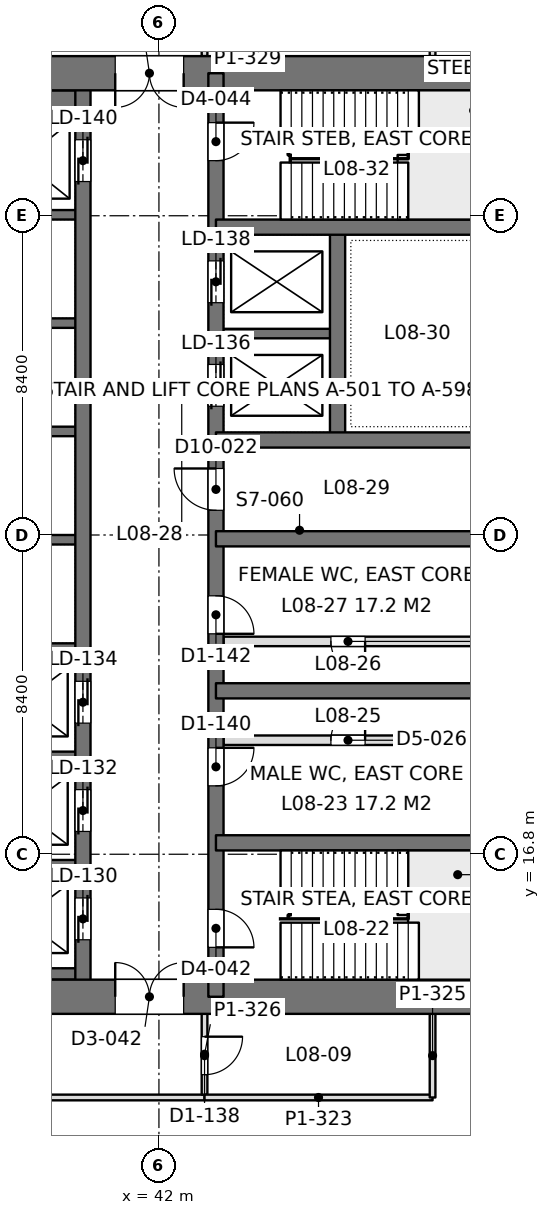
"""IFC4 building model, lengths in metres.
Left out: names, types, materials, properties, quantities, classifications, styles, units other than length and angle.
Written with IfcOpenShell. Run it as: python <this file> out.ifc"""

import sys

from ifc_helpers import new_model, si_unit, direction, frame, frame_2d, origin, place, context, subcontext, project, spatial, rectangle, extrude, element, fill, save


model = new_model("IFC4")
c1 = context("Model", 3, precision=1e-05, world=origin(), true_north=direction((0.0, 1.0)))
c2 = subcontext(c1, "Body", "Model", "MODEL_VIEW")
j1 = project(units=[si_unit("LENGTHUNIT", "METRE"), si_unit("PLANEANGLEUNIT", "RADIAN")], contexts=[c1])
p1 = place(None, origin())
s1 = spatial("IfcSite", under=j1, at=p1, CompositionType="ELEMENT")
p2 = place(p1, origin())
s2 = spatial("IfcBuilding", under=s1, at=p2, CompositionType="ELEMENT")
p3 = place(p2, frame((0.0, 0.0, 36.9)))
s3 = spatial("IfcBuildingStorey", under=s2, at=p3, CompositionType="ELEMENT", Elevation=36.9)
p4 = place(p3, frame((33.6, 13.05, 0.0), z_axis=(0.0, 0.0, 1.0), x_axis=(1.0, 0.0, 0.0)))
e1 = element("IfcWall", 1, at=p4, inside=s3, PredefinedType="SHEAR", context=c2, shape_type="SweptSolid", body=[
    extrude(rectangle(XDim=18.0, YDim=0.9, at=frame_2d((9.0, 0.0))), origin(), (0.0, 0.0, 1.0), 4.5),
])
p5 = place(p4, frame((7.25, 0.0, 0.0)))
e2 = element("IfcOpeningElement", 2, at=p5, cuts=e1, PredefinedType="OPENING", context=c2, shape_type="SweptSolid", body=[
    extrude(rectangle(XDim=1.8, YDim=2.4, at=frame_2d((0.9, 1.2))), frame((0.0, 0.46, 0.0), z_axis=(0.0, -1.0, 0.0), x_axis=(1.0, 0.0, 0.0)), (0.0, 0.0, 1.0), 0.92),
])
p6 = place(p3, frame((33.6, 37.35, 0.0), z_axis=(0.0, 0.0, 1.0), x_axis=(1.0, 0.0, 0.0)))
e3 = element("IfcWall", 3, at=p6, inside=s3, PredefinedType="SHEAR", context=c2, shape_type="SweptSolid", body=[
    extrude(rectangle(XDim=18.0, YDim=0.9, at=frame_2d((9.0, 0.0))), origin(), (0.0, 0.0, 1.0), 4.5),
])
p7 = place(p6, frame((7.25, 0.0, 0.0)))
e4 = element("IfcOpeningElement", 4, at=p7, cuts=e3, PredefinedType="OPENING", context=c2, shape_type="SweptSolid", body=[
    extrude(rectangle(XDim=1.8, YDim=2.4, at=frame_2d((0.9, 1.2))), frame((0.0, 0.46, 0.0), z_axis=(0.0, -1.0, 0.0), x_axis=(1.0, 0.0, 0.0)), (0.0, 0.0, 1.0), 0.92),
])
p8 = place(p3, frame((43.5, 13.05, 0.0), z_axis=(0.0, 0.0, 1.0), x_axis=(0.0, 1.0, 0.0)))
e5 = element("IfcWall", 5, at=p8, inside=s3, PredefinedType="SHEAR", context=c2, shape_type="SweptSolid", body=[
    extrude(rectangle(XDim=24.3, YDim=0.4, at=frame_2d((12.15, 0.0))), origin(), (0.0, 0.0, 1.0), 4.5),
])
p9 = place(p8, frame((1.3, 0.0, 0.0)))
e6 = element("IfcOpeningElement", 6, at=p9, cuts=e5, PredefinedType="OPENING", context=c2, shape_type="SweptSolid", body=[
    extrude(rectangle(XDim=1.0, YDim=2.2, at=frame_2d((0.5, 1.1))), frame((0.0, 0.21, 0.0), z_axis=(0.0, -1.0, 0.0), x_axis=(1.0, 0.0, 0.0)), (0.0, 0.0, 1.0), 0.42),
])
p10 = place(p8, frame((22.0, 0.0, 0.0)))
e7 = element("IfcOpeningElement", 7, at=p10, cuts=e5, PredefinedType="OPENING", context=c2, shape_type="SweptSolid", body=[
    extrude(rectangle(XDim=1.0, YDim=2.2, at=frame_2d((0.5, 1.1))), frame((0.0, 0.21, 0.0), z_axis=(0.0, -1.0, 0.0), x_axis=(1.0, 0.0, 0.0)), (0.0, 0.0, 1.0), 0.42),
])
p11 = place(p8, frame((5.55, 0.0, 0.0)))
e8 = element("IfcOpeningElement", 8, at=p11, cuts=e5, PredefinedType="OPENING", context=c2, shape_type="SweptSolid", body=[
    extrude(rectangle(XDim=1.0, YDim=2.2, at=frame_2d((0.5, 1.1))), frame((0.0, 0.21, 0.0), z_axis=(0.0, -1.0, 0.0), x_axis=(1.0, 0.0, 0.0)), (0.0, 0.0, 1.0), 0.42),
])
p12 = place(p8, frame((9.55, 0.0, 0.0)))
e9 = element("IfcOpeningElement", 9, at=p12, cuts=e5, PredefinedType="OPENING", context=c2, shape_type="SweptSolid", body=[
    extrude(rectangle(XDim=1.0, YDim=2.2, at=frame_2d((0.5, 1.1))), frame((0.0, 0.21, 0.0), z_axis=(0.0, -1.0, 0.0), x_axis=(1.0, 0.0, 0.0)), (0.0, 0.0, 1.0), 0.42),
])
p13 = place(p8, frame((12.8, 0.0, 0.0)))
e10 = element("IfcOpeningElement", 10, at=p13, cuts=e5, PredefinedType="OPENING", context=c2, shape_type="SweptSolid", body=[
    extrude(rectangle(XDim=1.1, YDim=2.2, at=frame_2d((0.55, 1.1))), frame((0.0, 0.21, 0.0), z_axis=(0.0, -1.0, 0.0), x_axis=(1.0, 0.0, 0.0)), (0.0, 0.0, 1.0), 0.42),
])
p14 = place(p8, frame((15.538, 0.0, 0.0)))
e11 = element("IfcOpeningElement", 11, at=p14, cuts=e5, PredefinedType="OPENING", context=c2, shape_type="SweptSolid", body=[
    extrude(rectangle(XDim=1.1, YDim=2.2, at=frame_2d((0.55, 1.1))), frame((0.0, 0.21, 0.0), z_axis=(0.0, -1.0, 0.0), x_axis=(1.0, 0.0, 0.0)), (0.0, 0.0, 1.0), 0.42),
])
p15 = place(p8, frame((18.262, 0.0, 0.0)))
e12 = element("IfcOpeningElement", 12, at=p15, cuts=e5, PredefinedType="OPENING", context=c2, shape_type="SweptSolid", body=[
    extrude(rectangle(XDim=1.1, YDim=2.2, at=frame_2d((0.55, 1.1))), frame((0.0, 0.21, 0.0), z_axis=(0.0, -1.0, 0.0), x_axis=(1.0, 0.0, 0.0)), (0.0, 0.0, 1.0), 0.42),
])
p16 = place(p3, frame((40.0, 13.05, 0.0), z_axis=(0.0, 0.0, 1.0), x_axis=(0.0, 1.0, 0.0)))
e13 = element("IfcWall", 13, at=p16, inside=s3, PredefinedType="SHEAR", context=c2, shape_type="SweptSolid", body=[
    extrude(rectangle(XDim=24.3, YDim=0.4, at=frame_2d((12.15, 0.0))), origin(), (0.0, 0.0, 1.0), 4.5),
])
p17 = place(p16, frame((1.5, 0.0, 0.0)))
e14 = element("IfcOpeningElement", 14, at=p17, cuts=e13, PredefinedType="OPENING", context=c2, shape_type="SweptSolid", body=[
    extrude(rectangle(XDim=1.1, YDim=2.2, at=frame_2d((0.55, 1.1))), frame((0.0, 0.21, 0.0), z_axis=(0.0, -1.0, 0.0), x_axis=(1.0, 0.0, 0.0)), (0.0, 0.0, 1.0), 0.42),
])
p18 = place(p16, frame((4.35, 0.0, 0.0)))
e15 = element("IfcOpeningElement", 15, at=p18, cuts=e13, PredefinedType="OPENING", context=c2, shape_type="SweptSolid", body=[
    extrude(rectangle(XDim=1.1, YDim=2.2, at=frame_2d((0.55, 1.1))), frame((0.0, 0.21, 0.0), z_axis=(0.0, -1.0, 0.0), x_axis=(1.0, 0.0, 0.0)), (0.0, 0.0, 1.0), 0.42),
])
p19 = place(p16, frame((7.2, 0.0, 0.0)))
e16 = element("IfcOpeningElement", 16, at=p19, cuts=e13, PredefinedType="OPENING", context=c2, shape_type="SweptSolid", body=[
    extrude(rectangle(XDim=1.1, YDim=2.2, at=frame_2d((0.55, 1.1))), frame((0.0, 0.21, 0.0), z_axis=(0.0, -1.0, 0.0), x_axis=(1.0, 0.0, 0.0)), (0.0, 0.0, 1.0), 0.42),
])
p20 = place(p16, frame((21.45, 0.0, 0.0)))
e17 = element("IfcOpeningElement", 17, at=p20, cuts=e13, PredefinedType="OPENING", context=c2, shape_type="SweptSolid", body=[
    extrude(rectangle(XDim=1.1, YDim=2.2, at=frame_2d((0.55, 1.1))), frame((0.0, 0.21, 0.0), z_axis=(0.0, -1.0, 0.0), x_axis=(1.0, 0.0, 0.0)), (0.0, 0.0, 1.0), 0.42),
])
for number, where, z_axis, x_axis in (
    (18, (51.15, 17.1, 0.0), (0.0, 0.0, 1.0), (-1.0, 0.0, 0.0)),
    (19, (51.15, 21.1, 0.0), (0.0, 0.0, 1.0), (-1.0, 0.0, 0.0)),
    (20, (51.15, 25.1, 0.0), (0.0, 0.0, 1.0), (-1.0, 0.0, 0.0)),
    (21, (51.15, 27.7, 0.0), (0.0, 0.0, 1.0), (-1.0, 0.0, 0.0)),
    (22, (51.15, 33.3, 0.0), (0.0, 0.0, 1.0), (-1.0, 0.0, 0.0)),
):
    element("IfcWall", number, at=place(p3, frame(where, z_axis=z_axis, x_axis=x_axis)), inside=s3, PredefinedType="SHEAR", context=c2, shape_type="SweptSolid", body=[
        extrude(rectangle(XDim=7.65, YDim=0.4, at=frame_2d((3.825, 0.0))), origin(), (0.0, 0.0, 1.0), 4.5),
    ])
p21 = place(p3, frame((46.7, 27.7, 0.0), z_axis=(0.0, 0.0, 1.0), x_axis=(0.0, 1.0, 0.0)))
e23 = element("IfcWall", 23, at=p21, inside=s3, PredefinedType="SHEAR", context=c2, shape_type="SweptSolid", body=[
    extrude(rectangle(XDim=5.6, YDim=0.4, at=frame_2d((2.8, 0.0))), origin(), (0.0, 0.0, 1.0), 4.5),
])
p22 = place(p3, frame((46.7, 30.5, 0.0), z_axis=(0.0, 0.0, 1.0), x_axis=(-1.0, 0.0, 0.0)))
e24 = element("IfcWall", 24, at=p22, inside=s3, PredefinedType="SHEAR", context=c2, shape_type="SweptSolid", body=[
    extrude(rectangle(XDim=3.2, YDim=0.25, at=frame_2d((1.6, 0.0))), origin(), (0.0, 0.0, 1.0), 4.5),
])
p23 = place(p3, frame((40.0, 13.65, 0.0), z_axis=(0.0, 0.0, 1.0), x_axis=(-1.0, 0.0, 0.0)))
e25 = element("IfcWall", 25, at=p23, inside=s3, PredefinedType="SHEAR", context=c2, shape_type="SweptSolid", body=[
    extrude(rectangle(XDim=3.2, YDim=0.3, at=frame_2d((1.6, 0.0))), origin(), (0.0, 0.0, 1.0), 4.5),
])
for number, where, z_axis, x_axis in (
    (26, (40.0, 16.525, 0.0), (0.0, 0.0, 1.0), (-1.0, 0.0, 0.0)),
    (27, (40.0, 19.375, 0.0), (0.0, 0.0, 1.0), (-1.0, 0.0, 0.0)),
    (28, (40.0, 22.225, 0.0), (0.0, 0.0, 1.0), (-1.0, 0.0, 0.0)),
    (29, (40.0, 25.075, 0.0), (0.0, 0.0, 1.0), (-1.0, 0.0, 0.0)),
    (30, (40.0, 27.925, 0.0), (0.0, 0.0, 1.0), (-1.0, 0.0, 0.0)),
    (31, (40.0, 30.775, 0.0), (0.0, 0.0, 1.0), (-1.0, 0.0, 0.0)),
    (32, (40.0, 33.625, 0.0), (0.0, 0.0, 1.0), (-1.0, 0.0, 0.0)),
):
    element("IfcWall", number, at=place(p3, frame(where, z_axis=z_axis, x_axis=x_axis)), inside=s3, PredefinedType="SHEAR", context=c2, shape_type="SweptSolid", body=[
        extrude(rectangle(XDim=3.2, YDim=0.25, at=frame_2d((1.6, 0.0))), origin(), (0.0, 0.0, 1.0), 4.5),
    ])
p24 = place(p3, frame((40.0, 36.625, 0.0), z_axis=(0.0, 0.0, 1.0), x_axis=(-1.0, 0.0, 0.0)))
e33 = element("IfcWall", 33, at=p24, inside=s3, PredefinedType="SHEAR", context=c2, shape_type="SweptSolid", body=[
    extrude(rectangle(XDim=3.2, YDim=0.55, at=frame_2d((1.6, 0.0))), origin(), (0.0, 0.0, 1.0), 4.5),
])
p25 = place(p3, frame((1.2, 10.4, 0.0), z_axis=(0.0, 0.0, 1.0), x_axis=(1.0, 0.0, 0.0)))
e34 = element("IfcWall", 34, at=p25, inside=s3, PredefinedType="PARTITIONING", context=c2, shape_type="SweptSolid", body=[
    extrude(rectangle(XDim=42.002, YDim=0.15, at=frame_2d((21.001, 0.0))), origin(), (0.0, 0.0, 1.0), 3.74),
])
p26 = place(p25, frame((2.1, 0.0, 0.0)))
e35 = element("IfcOpeningElement", 35, at=p26, cuts=e34, PredefinedType="OPENING", context=c2, shape_type="SweptSolid", body=[
    extrude(rectangle(XDim=1.8, YDim=2.2, at=frame_2d((0.9, 1.1))), frame((0.0, 0.085, 0.0), z_axis=(0.0, -1.0, 0.0), x_axis=(1.0, 0.0, 0.0)), (0.0, 0.0, 1.0), 0.17),
])
p27 = place(p25, frame((10.5, 0.0, 0.0)))
e36 = element("IfcOpeningElement", 36, at=p27, cuts=e34, PredefinedType="OPENING", context=c2, shape_type="SweptSolid", body=[
    extrude(rectangle(XDim=1.8, YDim=2.2, at=frame_2d((0.9, 1.1))), frame((0.0, 0.085, 0.0), z_axis=(0.0, -1.0, 0.0), x_axis=(1.0, 0.0, 0.0)), (0.0, 0.0, 1.0), 0.17),
])
p28 = place(p25, frame((18.9, 0.0, 0.0)))
e37 = element("IfcOpeningElement", 37, at=p28, cuts=e34, PredefinedType="OPENING", context=c2, shape_type="SweptSolid", body=[
    extrude(rectangle(XDim=1.8, YDim=2.2, at=frame_2d((0.9, 1.1))), frame((0.0, 0.085, 0.0), z_axis=(0.0, -1.0, 0.0), x_axis=(1.0, 0.0, 0.0)), (0.0, 0.0, 1.0), 0.17),
])
p29 = place(p25, frame((27.3, 0.0, 0.0)))
e38 = element("IfcOpeningElement", 38, at=p29, cuts=e34, PredefinedType="OPENING", context=c2, shape_type="SweptSolid", body=[
    extrude(rectangle(XDim=1.8, YDim=2.2, at=frame_2d((0.9, 1.1))), frame((0.0, 0.085, 0.0), z_axis=(0.0, -1.0, 0.0), x_axis=(1.0, 0.0, 0.0)), (0.0, 0.0, 1.0), 0.17),
])
p30 = place(p25, frame((35.7, 0.0, 0.0)))
e39 = element("IfcOpeningElement", 39, at=p30, cuts=e34, PredefinedType="OPENING", context=c2, shape_type="SweptSolid", body=[
    extrude(rectangle(XDim=1.8, YDim=2.2, at=frame_2d((0.9, 1.1))), frame((0.0, 0.085, 0.0), z_axis=(0.0, -1.0, 0.0), x_axis=(1.0, 0.0, 0.0)), (0.0, 0.0, 1.0), 0.17),
])
p31 = place(p3, frame((43.2, 10.474, 0.0), z_axis=(0.0, 0.0, 1.0), x_axis=(0.0, 1.0, 0.0)))
e40 = element("IfcWall", 40, at=p31, inside=s3, PredefinedType="PARTITIONING", context=c2, shape_type="SweptSolid", body=[
    extrude(rectangle(XDim=2.128, YDim=0.15, at=frame_2d((1.064, 0.0))), origin(), (0.0, 0.0, 1.0), 4.34),
])
p32 = place(p31, frame((0.526, 0.0, 0.0)))
e41 = element("IfcOpeningElement", 41, at=p32, cuts=e40, PredefinedType="OPENING", context=c2, shape_type="SweptSolid", body=[
    extrude(rectangle(XDim=1.0, YDim=2.2, at=frame_2d((0.5, 1.1))), frame((0.0, 0.085, 0.0), z_axis=(0.0, -1.0, 0.0), x_axis=(1.0, 0.0, 0.0)), (0.0, 0.0, 1.0), 0.17),
])
p33 = place(p3, frame((43.198, 10.4, 0.0), z_axis=(0.0, 0.0, 1.0), x_axis=(1.0, 0.0, 0.0)))
e42 = element("IfcWall", 42, at=p33, inside=s3, PredefinedType="PARTITIONING", context=c2, shape_type="SweptSolid", body=[
    extrude(rectangle(XDim=6.002, YDim=0.15, at=frame_2d((3.001, 0.0))), origin(), (0.0, 0.0, 1.0), 4.34),
])
p34 = place(p3, frame((49.2, 10.4, 0.0), z_axis=(0.0, 0.0, 1.0), x_axis=(0.0, 1.0, 0.0)))
e43 = element("IfcWall", 43, at=p34, inside=s3, PredefinedType="PARTITIONING", context=c2, shape_type="SweptSolid", body=[
    extrude(rectangle(XDim=2.202, YDim=0.15, at=frame_2d((1.101, 0.0))), origin(), (0.0, 0.0, 1.0), 4.34),
])
p35 = place(p3, frame((43.2, 37.8, 0.0), z_axis=(0.0, 0.0, 1.0), x_axis=(0.0, 1.0, 0.0)))
e44 = element("IfcWall", 44, at=p35, inside=s3, PredefinedType="PARTITIONING", context=c2, shape_type="SweptSolid", body=[
    extrude(rectangle(XDim=2.126, YDim=0.15, at=frame_2d((1.063, 0.0))), origin(), (0.0, 0.0, 1.0), 4.34),
])
p36 = place(p35, frame((0.6, 0.0, 0.0)))
e45 = element("IfcOpeningElement", 45, at=p36, cuts=e44, PredefinedType="OPENING", context=c2, shape_type="SweptSolid", body=[
    extrude(rectangle(XDim=1.0, YDim=2.2, at=frame_2d((0.5, 1.1))), frame((0.0, 0.085, 0.0), z_axis=(0.0, -1.0, 0.0), x_axis=(1.0, 0.0, 0.0)), (0.0, 0.0, 1.0), 0.17),
])
p37 = place(p3, frame((49.2, 37.8, 0.0), z_axis=(0.0, 0.0, 1.0), x_axis=(0.0, 1.0, 0.0)))
e46 = element("IfcWall", 46, at=p37, inside=s3, PredefinedType="PARTITIONING", context=c2, shape_type="SweptSolid", body=[
    extrude(rectangle(XDim=2.2, YDim=0.15, at=frame_2d((1.1, 0.0))), origin(), (0.0, 0.0, 1.0), 4.34),
])
p38 = place(p3, frame((43.7, 22.4, 0.0), z_axis=(0.0, 0.0, 1.0), x_axis=(1.0, 0.0, 0.0)))
e47 = element("IfcWall", 47, at=p38, inside=s3, PredefinedType="PARTITIONING", context=c2, shape_type="SweptSolid", body=[
    extrude(rectangle(XDim=6.6, YDim=0.25, at=frame_2d((3.3, 0.0))), origin(), (0.0, 0.0, 1.0), 4.3),
])
p39 = place(p38, frame((2.825, 0.0, 0.0)))
e48 = element("IfcOpeningElement", 48, at=p39, cuts=e47, PredefinedType="OPENING", context=c2, shape_type="SweptSolid", body=[
    extrude(rectangle(XDim=0.9, YDim=2.2, at=frame_2d((0.45, 1.1))), frame((0.0, 0.135, 0.0), z_axis=(0.0, -1.0, 0.0), x_axis=(1.0, 0.0, 0.0)), (0.0, 0.0, 1.0), 0.27),
])
p40 = place(p3, frame((43.7, 19.8, 0.0), z_axis=(0.0, 0.0, 1.0), x_axis=(1.0, 0.0, 0.0)))
e49 = element("IfcWall", 49, at=p40, inside=s3, PredefinedType="PARTITIONING", context=c2, shape_type="SweptSolid", body=[
    extrude(rectangle(XDim=6.6, YDim=0.25, at=frame_2d((3.3, 0.0))), origin(), (0.0, 0.0, 1.0), 4.3),
])
p41 = place(p40, frame((2.825, 0.0, 0.0)))
e50 = element("IfcOpeningElement", 50, at=p41, cuts=e49, PredefinedType="OPENING", context=c2, shape_type="SweptSolid", body=[
    extrude(rectangle(XDim=0.9, YDim=2.2, at=frame_2d((0.45, 1.1))), frame((0.0, 0.135, 0.0), z_axis=(0.0, -1.0, 0.0), x_axis=(1.0, 0.0, 0.0)), (0.0, 0.0, 1.0), 0.27),
])
p42 = place(p5, origin())
e51 = element("IfcDoor", 51, at=p42, inside=s3, OperationType="DOUBLE_DOOR_SINGLE_SWING", PredefinedType="DOOR", context=c2, shape_type="SweptSolid", body=[
    extrude(rectangle(XDim=1.8, YDim=2.4, at=frame_2d((0.9, 1.2))), frame((0.0, 0.025, 0.0), z_axis=(0.0, -1.0, 0.0), x_axis=(1.0, 0.0, 0.0)), (0.0, 0.0, 1.0), 0.05),
])
fill(e2, e51)
p43 = place(p7, frame((1.8, 0.0, 0.0), z_axis=(0.0, 0.0, 1.0), x_axis=(-1.0, 0.0, 0.0)))
e52 = element("IfcDoor", 52, at=p43, inside=s3, OperationType="DOUBLE_DOOR_SINGLE_SWING", PredefinedType="DOOR", context=c2, shape_type="SweptSolid", body=[
    extrude(rectangle(XDim=1.8, YDim=2.4, at=frame_2d((0.9, 1.2))), frame((0.0, 0.025, 0.0), z_axis=(0.0, -1.0, 0.0), x_axis=(1.0, 0.0, 0.0)), (0.0, 0.0, 1.0), 0.05),
])
fill(e4, e52)
p44 = place(p9, frame((1.0, 0.0, 0.0), z_axis=(0.0, 0.0, 1.0), x_axis=(-1.0, 0.0, 0.0)))
e53 = element("IfcDoor", 53, at=p44, inside=s3, OperationType="SINGLE_SWING_RIGHT", PredefinedType="DOOR", context=c2, shape_type="SweptSolid", body=[
    extrude(rectangle(XDim=1.0, YDim=2.2, at=frame_2d((0.5, 1.1))), frame((0.0, 0.025, 0.0), z_axis=(0.0, -1.0, 0.0), x_axis=(1.0, 0.0, 0.0)), (0.0, 0.0, 1.0), 0.05),
])
fill(e6, e53)
p45 = place(p10, frame((1.0, 0.0, 0.0), z_axis=(0.0, 0.0, 1.0), x_axis=(-1.0, 0.0, 0.0)))
e54 = element("IfcDoor", 54, at=p45, inside=s3, OperationType="SINGLE_SWING_LEFT", PredefinedType="DOOR", context=c2, shape_type="SweptSolid", body=[
    extrude(rectangle(XDim=1.0, YDim=2.2, at=frame_2d((0.5, 1.1))), frame((0.0, 0.025, 0.0), z_axis=(0.0, -1.0, 0.0), x_axis=(1.0, 0.0, 0.0)), (0.0, 0.0, 1.0), 0.05),
])
fill(e7, e54)
p46 = place(p11, frame((1.0, 0.0, 0.0), z_axis=(0.0, 0.0, 1.0), x_axis=(-1.0, 0.0, 0.0)))
e55 = element("IfcDoor", 55, at=p46, inside=s3, OperationType="SINGLE_SWING_LEFT", PredefinedType="DOOR", context=c2, shape_type="SweptSolid", body=[
    extrude(rectangle(XDim=1.0, YDim=2.2, at=frame_2d((0.5, 1.1))), frame((0.0, 0.025, 0.0), z_axis=(0.0, -1.0, 0.0), x_axis=(1.0, 0.0, 0.0)), (0.0, 0.0, 1.0), 0.05),
])
fill(e8, e55)
p47 = place(p12, frame((1.0, 0.0, 0.0), z_axis=(0.0, 0.0, 1.0), x_axis=(-1.0, 0.0, 0.0)))
e56 = element("IfcDoor", 56, at=p47, inside=s3, OperationType="SINGLE_SWING_RIGHT", PredefinedType="DOOR", context=c2, shape_type="SweptSolid", body=[
    extrude(rectangle(XDim=1.0, YDim=2.2, at=frame_2d((0.5, 1.1))), frame((0.0, 0.025, 0.0), z_axis=(0.0, -1.0, 0.0), x_axis=(1.0, 0.0, 0.0)), (0.0, 0.0, 1.0), 0.05),
])
fill(e9, e56)
p48 = place(p13, origin())
e57 = element("IfcDoor", 57, at=p48, inside=s3, OperationType="SINGLE_SWING_RIGHT", PredefinedType="DOOR", context=c2, shape_type="SweptSolid", body=[
    extrude(rectangle(XDim=1.1, YDim=2.2, at=frame_2d((0.55, 1.1))), frame((0.0, 0.025, 0.0), z_axis=(0.0, -1.0, 0.0), x_axis=(1.0, 0.0, 0.0)), (0.0, 0.0, 1.0), 0.05),
])
fill(e10, e57)
p49 = place(p17, origin())
e58 = element("IfcDoor", 58, at=p49, inside=s3, OperationType="DOUBLE_DOOR_SLIDING", PredefinedType="DOOR", context=c2, shape_type="SweptSolid", body=[
    extrude(rectangle(XDim=1.1, YDim=2.2, at=frame_2d((0.55, 1.1))), frame((0.0, 0.025, 0.0), z_axis=(0.0, -1.0, 0.0), x_axis=(1.0, 0.0, 0.0)), (0.0, 0.0, 1.0), 0.05),
])
fill(e14, e58)
p50 = place(p18, origin())
e59 = element("IfcDoor", 59, at=p50, inside=s3, OperationType="DOUBLE_DOOR_SLIDING", PredefinedType="DOOR", context=c2, shape_type="SweptSolid", body=[
    extrude(rectangle(XDim=1.1, YDim=2.2, at=frame_2d((0.55, 1.1))), frame((0.0, 0.025, 0.0), z_axis=(0.0, -1.0, 0.0), x_axis=(1.0, 0.0, 0.0)), (0.0, 0.0, 1.0), 0.05),
])
fill(e15, e59)
p51 = place(p19, origin())
e60 = element("IfcDoor", 60, at=p51, inside=s3, OperationType="DOUBLE_DOOR_SLIDING", PredefinedType="DOOR", context=c2, shape_type="SweptSolid", body=[
    extrude(rectangle(XDim=1.1, YDim=2.2, at=frame_2d((0.55, 1.1))), frame((0.0, 0.025, 0.0), z_axis=(0.0, -1.0, 0.0), x_axis=(1.0, 0.0, 0.0)), (0.0, 0.0, 1.0), 0.05),
])
fill(e16, e60)
p52 = place(p20, origin())
e61 = element("IfcDoor", 61, at=p52, inside=s3, OperationType="DOUBLE_DOOR_SLIDING", PredefinedType="DOOR", context=c2, shape_type="SweptSolid", body=[
    extrude(rectangle(XDim=1.1, YDim=2.2, at=frame_2d((0.55, 1.1))), frame((0.0, 0.025, 0.0), z_axis=(0.0, -1.0, 0.0), x_axis=(1.0, 0.0, 0.0)), (0.0, 0.0, 1.0), 0.05),
])
fill(e17, e61)
p53 = place(p14, origin())
e62 = element("IfcDoor", 62, at=p53, inside=s3, OperationType="DOUBLE_DOOR_SLIDING", PredefinedType="DOOR", context=c2, shape_type="SweptSolid", body=[
    extrude(rectangle(XDim=1.1, YDim=2.2, at=frame_2d((0.55, 1.1))), frame((0.0, 0.025, 0.0), z_axis=(0.0, -1.0, 0.0), x_axis=(1.0, 0.0, 0.0)), (0.0, 0.0, 1.0), 0.05),
])
fill(e11, e62)
p54 = place(p15, origin())
e63 = element("IfcDoor", 63, at=p54, inside=s3, OperationType="DOUBLE_DOOR_SLIDING", PredefinedType="DOOR", context=c2, shape_type="SweptSolid", body=[
    extrude(rectangle(XDim=1.1, YDim=2.2, at=frame_2d((0.55, 1.1))), frame((0.0, 0.025, 0.0), z_axis=(0.0, -1.0, 0.0), x_axis=(1.0, 0.0, 0.0)), (0.0, 0.0, 1.0), 0.05),
])
fill(e12, e63)
p55 = place(p32, frame((1.0, 0.0, 0.0), z_axis=(0.0, 0.0, 1.0), x_axis=(-1.0, 0.0, 0.0)))
e64 = element("IfcDoor", 64, at=p55, inside=s3, OperationType="SINGLE_SWING_LEFT", PredefinedType="DOOR", context=c2, shape_type="SweptSolid", body=[
    extrude(rectangle(XDim=1.0, YDim=2.2, at=frame_2d((0.5, 1.1))), frame((0.0, 0.025, 0.0), z_axis=(0.0, -1.0, 0.0), x_axis=(1.0, 0.0, 0.0)), (0.0, 0.0, 1.0), 0.05),
])
fill(e41, e64)
p56 = place(p39, frame((0.9, 0.0, 0.0), z_axis=(0.0, 0.0, 1.0), x_axis=(-1.0, 0.0, 0.0)))
e65 = element("IfcDoor", 65, at=p56, inside=s3, OperationType="SINGLE_SWING_LEFT", PredefinedType="DOOR", context=c2, shape_type="SweptSolid", body=[
    extrude(rectangle(XDim=0.9, YDim=2.2, at=frame_2d((0.45, 1.1))), frame((0.0, 0.025, 0.0), z_axis=(0.0, -1.0, 0.0), x_axis=(1.0, 0.0, 0.0)), (0.0, 0.0, 1.0), 0.05),
])
fill(e48, e65)
p57 = place(p41, origin())
e66 = element("IfcDoor", 66, at=p57, inside=s3, OperationType="SINGLE_SWING_RIGHT", PredefinedType="DOOR", context=c2, shape_type="SweptSolid", body=[
    extrude(rectangle(XDim=0.9, YDim=2.2, at=frame_2d((0.45, 1.1))), frame((0.0, 0.025, 0.0), z_axis=(0.0, -1.0, 0.0), x_axis=(1.0, 0.0, 0.0)), (0.0, 0.0, 1.0), 0.05),
])
fill(e50, e66)
save(model, sys.argv[1])
